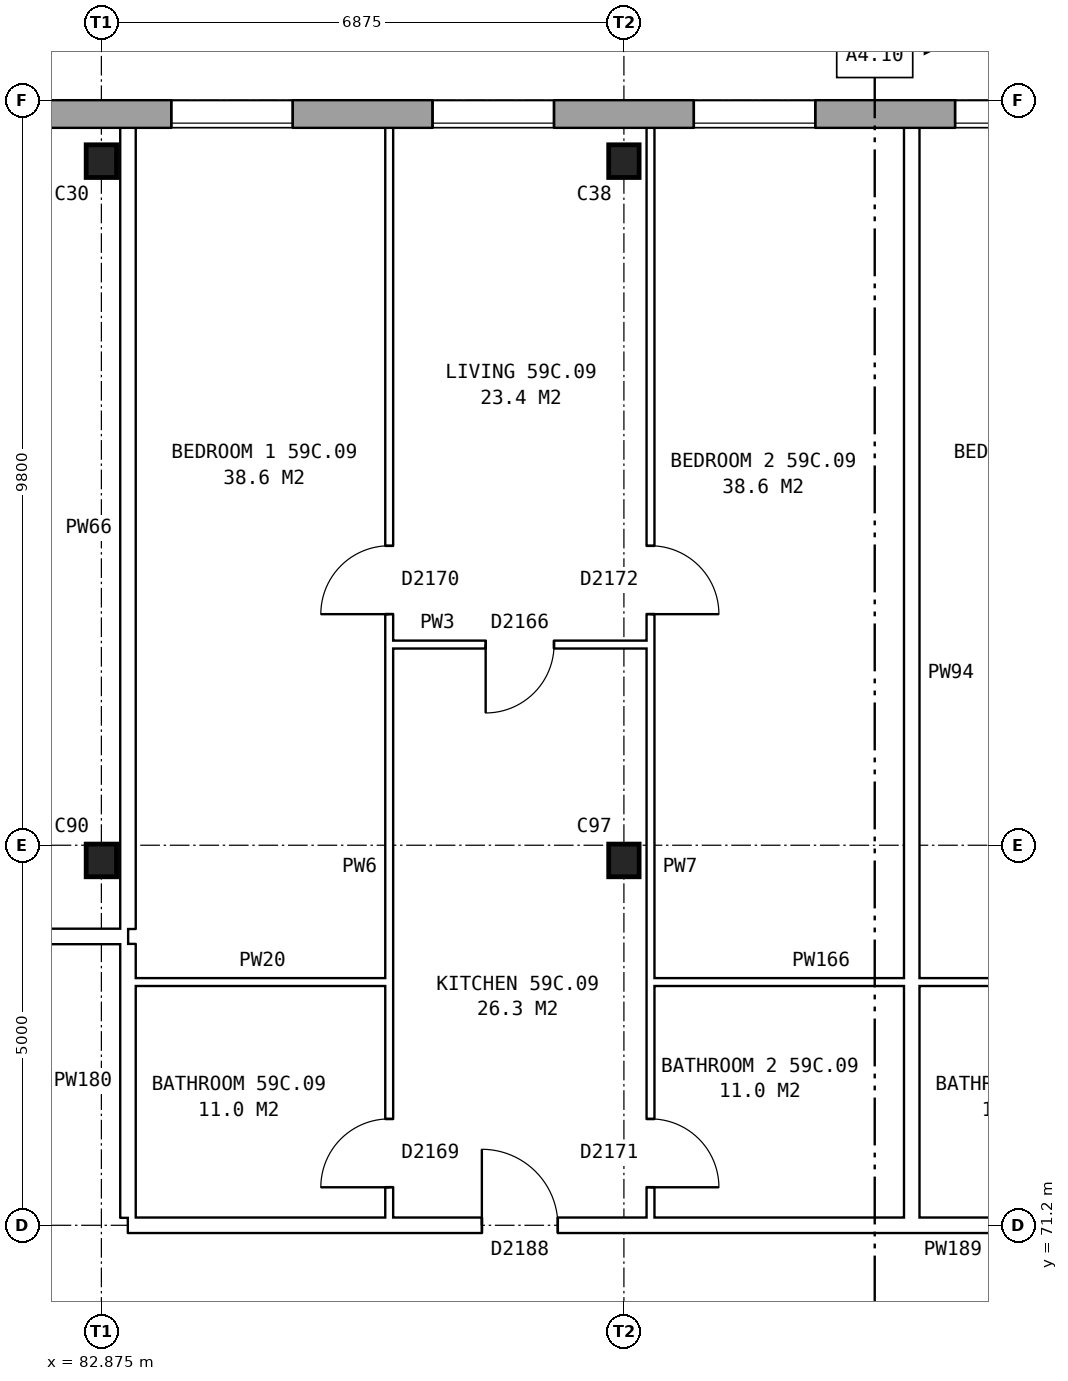
"""IFC4 building model, lengths in metres.
Left out: names, types, materials, properties, quantities, classifications, styles, units other than length and angle.
Written with IfcOpenShell. Run it as: python <this file> out.ifc"""

import sys

from ifc_helpers import new_model, si_unit, direction, frame, frame_2d, origin, origin_2d, place, context, subcontext, project, spatial, rectangle, i_section, extrude, element, fill, save


model = new_model("IFC4")
c1 = context("Model", 3, precision=1e-05, world=origin(), true_north=direction((0.0, 1.0)))
c2 = subcontext(c1, "Body", "Model", "MODEL_VIEW")
j1 = project(units=[si_unit("LENGTHUNIT", "METRE"), si_unit("PLANEANGLEUNIT", "RADIAN")], contexts=[c1])
p1 = place(None, origin())
s1 = spatial("IfcSite", under=j1, at=p1, CompositionType="ELEMENT")
p2 = place(p1, origin())
s2 = spatial("IfcBuilding", under=s1, at=p2, CompositionType="ELEMENT")
p3 = place(p2, frame((0.0, 0.0, 209.0)))
s3 = spatial("IfcBuildingStorey", under=s2, at=p3, CompositionType="ELEMENT", Elevation=209.0)
for number, where, z_axis, x_axis in (
    (1, (82.875, 76.0, 0.0), (0.0, 0.0, 1.0), (1.0, 0.0, 0.0)),
    (2, (89.75, 76.0, 0.0), (0.0, 0.0, 1.0), (1.0, 0.0, 0.0)),
    (3, (82.875, 85.2, 0.0), (0.0, 0.0, 1.0), (1.0, 0.0, 0.0)),
    (4, (89.75, 85.2, 0.0), (0.0, 0.0, 1.0), (1.0, 0.0, 0.0)),
):
    element("IfcColumn", number, at=place(p3, frame(where, z_axis=z_axis, x_axis=x_axis)), inside=s3, PredefinedType="COLUMN", context=c2, shape_type="SweptSolid", body=[
        extrude(i_section(OverallWidth=0.4, OverallDepth=0.43, WebThickness=0.04, FlangeThickness=0.04, at=origin_2d()), origin(), (0.0, 0.0, 1.0), 2.85),
    ])
p4 = place(p3, frame((131.05, 85.82, 0.0), z_axis=(0.0, 0.0, 1.0), x_axis=(-1.0, 0.0, 0.0)))
e5 = element("IfcWall", 5, at=p4, inside=s3, PredefinedType="STANDARD", context=c2, shape_type="SweptSolid", body=[
    extrude(rectangle(XDim=55.1, YDim=0.36, at=frame_2d((27.55, 0.0))), origin(), (0.0, 0.0, 1.0), 2.85),
])
p5 = place(p4, frame((0.969, 0.0, 0.8)))
e6 = element("IfcOpeningElement", 6, at=p5, cuts=e5, PredefinedType="OPENING", context=c2, shape_type="SweptSolid", body=[
    extrude(rectangle(XDim=1.6, YDim=1.8, at=frame_2d((0.8, 0.9))), frame((0.0, 0.19, 0.0), z_axis=(0.0, -1.0, 0.0), x_axis=(1.0, 0.0, 0.0)), (0.0, 0.0, 1.0), 0.38),
])
p6 = place(p4, frame((4.406, 0.0, 0.8)))
e7 = element("IfcOpeningElement", 7, at=p6, cuts=e5, PredefinedType="OPENING", context=c2, shape_type="SweptSolid", body=[
    extrude(rectangle(XDim=1.6, YDim=1.8, at=frame_2d((0.8, 0.9))), frame((0.0, 0.19, 0.0), z_axis=(0.0, -1.0, 0.0), x_axis=(1.0, 0.0, 0.0)), (0.0, 0.0, 1.0), 0.38),
])
p7 = place(p4, frame((7.844, 0.0, 0.8)))
e8 = element("IfcOpeningElement", 8, at=p7, cuts=e5, PredefinedType="OPENING", context=c2, shape_type="SweptSolid", body=[
    extrude(rectangle(XDim=1.6, YDim=1.8, at=frame_2d((0.8, 0.9))), frame((0.0, 0.19, 0.0), z_axis=(0.0, -1.0, 0.0), x_axis=(1.0, 0.0, 0.0)), (0.0, 0.0, 1.0), 0.38),
])
p8 = place(p4, frame((11.281, 0.0, 0.8)))
e9 = element("IfcOpeningElement", 9, at=p8, cuts=e5, PredefinedType="OPENING", context=c2, shape_type="SweptSolid", body=[
    extrude(rectangle(XDim=1.6, YDim=1.8, at=frame_2d((0.8, 0.9))), frame((0.0, 0.19, 0.0), z_axis=(0.0, -1.0, 0.0), x_axis=(1.0, 0.0, 0.0)), (0.0, 0.0, 1.0), 0.38),
])
p9 = place(p4, frame((14.719, 0.0, 0.8)))
e10 = element("IfcOpeningElement", 10, at=p9, cuts=e5, PredefinedType="OPENING", context=c2, shape_type="SweptSolid", body=[
    extrude(rectangle(XDim=1.6, YDim=1.8, at=frame_2d((0.8, 0.9))), frame((0.0, 0.19, 0.0), z_axis=(0.0, -1.0, 0.0), x_axis=(1.0, 0.0, 0.0)), (0.0, 0.0, 1.0), 0.38),
])
p10 = place(p4, frame((18.156, 0.0, 0.8)))
e11 = element("IfcOpeningElement", 11, at=p10, cuts=e5, PredefinedType="OPENING", context=c2, shape_type="SweptSolid", body=[
    extrude(rectangle(XDim=1.6, YDim=1.8, at=frame_2d((0.8, 0.9))), frame((0.0, 0.19, 0.0), z_axis=(0.0, -1.0, 0.0), x_axis=(1.0, 0.0, 0.0)), (0.0, 0.0, 1.0), 0.38),
])
p11 = place(p4, frame((21.594, 0.0, 0.8)))
e12 = element("IfcOpeningElement", 12, at=p11, cuts=e5, PredefinedType="OPENING", context=c2, shape_type="SweptSolid", body=[
    extrude(rectangle(XDim=1.6, YDim=1.8, at=frame_2d((0.8, 0.9))), frame((0.0, 0.19, 0.0), z_axis=(0.0, -1.0, 0.0), x_axis=(1.0, 0.0, 0.0)), (0.0, 0.0, 1.0), 0.38),
])
p12 = place(p4, frame((25.031, 0.0, 0.8)))
e13 = element("IfcOpeningElement", 13, at=p12, cuts=e5, PredefinedType="OPENING", context=c2, shape_type="SweptSolid", body=[
    extrude(rectangle(XDim=1.6, YDim=1.8, at=frame_2d((0.8, 0.9))), frame((0.0, 0.19, 0.0), z_axis=(0.0, -1.0, 0.0), x_axis=(1.0, 0.0, 0.0)), (0.0, 0.0, 1.0), 0.38),
])
p13 = place(p4, frame((28.469, 0.0, 0.8)))
e14 = element("IfcOpeningElement", 14, at=p13, cuts=e5, PredefinedType="OPENING", context=c2, shape_type="SweptSolid", body=[
    extrude(rectangle(XDim=1.6, YDim=1.8, at=frame_2d((0.8, 0.9))), frame((0.0, 0.19, 0.0), z_axis=(0.0, -1.0, 0.0), x_axis=(1.0, 0.0, 0.0)), (0.0, 0.0, 1.0), 0.38),
])
p14 = place(p4, frame((31.906, 0.0, 0.8)))
e15 = element("IfcOpeningElement", 15, at=p14, cuts=e5, PredefinedType="OPENING", context=c2, shape_type="SweptSolid", body=[
    extrude(rectangle(XDim=1.6, YDim=1.8, at=frame_2d((0.8, 0.9))), frame((0.0, 0.19, 0.0), z_axis=(0.0, -1.0, 0.0), x_axis=(1.0, 0.0, 0.0)), (0.0, 0.0, 1.0), 0.38),
])
p15 = place(p4, frame((35.344, 0.0, 0.8)))
e16 = element("IfcOpeningElement", 16, at=p15, cuts=e5, PredefinedType="OPENING", context=c2, shape_type="SweptSolid", body=[
    extrude(rectangle(XDim=1.6, YDim=1.8, at=frame_2d((0.8, 0.9))), frame((0.0, 0.19, 0.0), z_axis=(0.0, -1.0, 0.0), x_axis=(1.0, 0.0, 0.0)), (0.0, 0.0, 1.0), 0.38),
])
p16 = place(p4, frame((38.781, 0.0, 0.8)))
e17 = element("IfcOpeningElement", 17, at=p16, cuts=e5, PredefinedType="OPENING", context=c2, shape_type="SweptSolid", body=[
    extrude(rectangle(XDim=1.6, YDim=1.8, at=frame_2d((0.8, 0.9))), frame((0.0, 0.19, 0.0), z_axis=(0.0, -1.0, 0.0), x_axis=(1.0, 0.0, 0.0)), (0.0, 0.0, 1.0), 0.38),
])
p17 = place(p4, frame((42.219, 0.0, 0.8)))
e18 = element("IfcOpeningElement", 18, at=p17, cuts=e5, PredefinedType="OPENING", context=c2, shape_type="SweptSolid", body=[
    extrude(rectangle(XDim=1.6, YDim=1.8, at=frame_2d((0.8, 0.9))), frame((0.0, 0.19, 0.0), z_axis=(0.0, -1.0, 0.0), x_axis=(1.0, 0.0, 0.0)), (0.0, 0.0, 1.0), 0.38),
])
p18 = place(p4, frame((45.656, 0.0, 0.8)))
e19 = element("IfcOpeningElement", 19, at=p18, cuts=e5, PredefinedType="OPENING", context=c2, shape_type="SweptSolid", body=[
    extrude(rectangle(XDim=1.6, YDim=1.8, at=frame_2d((0.8, 0.9))), frame((0.0, 0.19, 0.0), z_axis=(0.0, -1.0, 0.0), x_axis=(1.0, 0.0, 0.0)), (0.0, 0.0, 1.0), 0.38),
])
p19 = place(p4, frame((49.094, 0.0, 0.8)))
e20 = element("IfcOpeningElement", 20, at=p19, cuts=e5, PredefinedType="OPENING", context=c2, shape_type="SweptSolid", body=[
    extrude(rectangle(XDim=1.6, YDim=1.8, at=frame_2d((0.8, 0.9))), frame((0.0, 0.19, 0.0), z_axis=(0.0, -1.0, 0.0), x_axis=(1.0, 0.0, 0.0)), (0.0, 0.0, 1.0), 0.38),
])
p20 = place(p4, frame((52.531, 0.0, 0.8)))
e21 = element("IfcOpeningElement", 21, at=p20, cuts=e5, PredefinedType="OPENING", context=c2, shape_type="SweptSolid", body=[
    extrude(rectangle(XDim=1.6, YDim=1.8, at=frame_2d((0.8, 0.9))), frame((0.0, 0.19, 0.0), z_axis=(0.0, -1.0, 0.0), x_axis=(1.0, 0.0, 0.0)), (0.0, 0.0, 1.0), 0.38),
])
p21 = place(p3, frame((83.225, 71.2, 0.0), z_axis=(0.0, 0.0, 1.0), x_axis=(1.0, 0.0, 0.0)))
e22 = element("IfcWall", 22, at=p21, inside=s3, PredefinedType="PARTITIONING", context=c2, shape_type="SweptSolid", body=[
    extrude(rectangle(XDim=41.25, YDim=0.2, at=frame_2d((20.625, 0.0))), origin(), (0.0, 0.0, 1.0), 2.85),
])
p22 = place(p21, frame((4.656, 0.0, 0.0)))
e23 = element("IfcOpeningElement", 23, at=p22, cuts=e22, PredefinedType="OPENING", context=c2, shape_type="SweptSolid", body=[
    extrude(rectangle(XDim=1.0, YDim=2.1, at=frame_2d((0.5, 1.05))), frame((0.0, 0.11, 0.0), z_axis=(0.0, -1.0, 0.0), x_axis=(1.0, 0.0, 0.0)), (0.0, 0.0, 1.0), 0.22),
])
p23 = place(p21, frame((14.969, 0.0, 0.0)))
e24 = element("IfcOpeningElement", 24, at=p23, cuts=e22, PredefinedType="OPENING", context=c2, shape_type="SweptSolid", body=[
    extrude(rectangle(XDim=1.0, YDim=2.1, at=frame_2d((0.5, 1.05))), frame((0.0, 0.11, 0.0), z_axis=(0.0, -1.0, 0.0), x_axis=(1.0, 0.0, 0.0)), (0.0, 0.0, 1.0), 0.22),
])
p24 = place(p21, frame((25.281, 0.0, 0.0)))
e25 = element("IfcOpeningElement", 25, at=p24, cuts=e22, PredefinedType="OPENING", context=c2, shape_type="SweptSolid", body=[
    extrude(rectangle(XDim=1.0, YDim=2.1, at=frame_2d((0.5, 1.05))), frame((0.0, 0.11, 0.0), z_axis=(0.0, -1.0, 0.0), x_axis=(1.0, 0.0, 0.0)), (0.0, 0.0, 1.0), 0.22),
])
p25 = place(p21, frame((35.594, 0.0, 0.0)))
e26 = element("IfcOpeningElement", 26, at=p25, cuts=e22, PredefinedType="OPENING", context=c2, shape_type="SweptSolid", body=[
    extrude(rectangle(XDim=1.0, YDim=2.1, at=frame_2d((0.5, 1.05))), frame((0.0, 0.11, 0.0), z_axis=(0.0, -1.0, 0.0), x_axis=(1.0, 0.0, 0.0)), (0.0, 0.0, 1.0), 0.22),
])
p26 = place(p3, frame((83.325, 74.4, 0.0), z_axis=(0.0, 0.0, 1.0), x_axis=(1.0, 0.0, 0.0)))
e27 = element("IfcWall", 27, at=p26, inside=s3, PredefinedType="PARTITIONING", context=c2, shape_type="SweptSolid", body=[
    extrude(rectangle(XDim=3.337, YDim=0.1, at=frame_2d((1.668, 0.0))), origin(), (0.0, 0.0, 1.0), 2.85),
])
p27 = place(p3, frame((90.1, 74.4, 0.0), z_axis=(0.0, 0.0, 1.0), x_axis=(1.0, 0.0, 0.0)))
e28 = element("IfcWall", 28, at=p27, inside=s3, PredefinedType="PARTITIONING", context=c2, shape_type="SweptSolid", body=[
    extrude(rectangle(XDim=6.875, YDim=0.1, at=frame_2d((3.438, 0.0))), origin(), (0.0, 0.0, 1.0), 2.85),
])
p28 = place(p3, frame((75.64, 75.0, 0.0), z_axis=(0.0, 0.0, 1.0), x_axis=(1.0, 0.0, 0.0)))
e29 = element("IfcWall", 29, at=p28, inside=s3, PredefinedType="PARTITIONING", context=c2, shape_type="SweptSolid", body=[
    extrude(rectangle(XDim=7.585, YDim=0.2, at=frame_2d((3.792, 0.0))), origin(), (0.0, 0.0, 1.0), 2.85),
])
p29 = place(p28, frame((3.343, 0.0, 0.0)))
e30 = element("IfcOpeningElement", 30, at=p29, cuts=e29, PredefinedType="OPENING", context=c2, shape_type="SweptSolid", body=[
    extrude(rectangle(XDim=0.9, YDim=2.1, at=frame_2d((0.45, 1.05))), frame((0.0, 0.11, 0.0), z_axis=(0.0, -1.0, 0.0), x_axis=(1.0, 0.0, 0.0)), (0.0, 0.0, 1.0), 0.22),
])
p30 = place(p3, frame((86.662, 78.84, 0.0), z_axis=(0.0, 0.0, 1.0), x_axis=(1.0, 0.0, 0.0)))
e31 = element("IfcWall", 31, at=p30, inside=s3, PredefinedType="PARTITIONING", context=c2, shape_type="SweptSolid", body=[
    extrude(rectangle(XDim=3.438, YDim=0.1, at=frame_2d((1.719, 0.0))), origin(), (0.0, 0.0, 1.0), 2.85),
])
p31 = place(p30, frame((1.269, 0.0, 0.0)))
e32 = element("IfcOpeningElement", 32, at=p31, cuts=e31, PredefinedType="OPENING", context=c2, shape_type="SweptSolid", body=[
    extrude(rectangle(XDim=0.9, YDim=2.1, at=frame_2d((0.45, 1.05))), frame((0.0, 0.06, 0.0), z_axis=(0.0, -1.0, 0.0), x_axis=(1.0, 0.0, 0.0)), (0.0, 0.0, 1.0), 0.12),
])
p32 = place(p3, frame((83.225, 71.3, 0.0), z_axis=(0.0, 0.0, 1.0), x_axis=(0.0, 1.0, 0.0)))
e33 = element("IfcWall", 33, at=p32, inside=s3, PredefinedType="PARTITIONING", context=c2, shape_type="SweptSolid", body=[
    extrude(rectangle(XDim=3.6, YDim=0.2, at=frame_2d((1.8, 0.0))), origin(), (0.0, 0.0, 1.0), 2.85),
])
p33 = place(p3, frame((83.225, 75.1, 0.0), z_axis=(0.0, 0.0, 1.0), x_axis=(0.0, 1.0, 0.0)))
e34 = element("IfcWall", 34, at=p33, inside=s3, PredefinedType="PARTITIONING", context=c2, shape_type="SweptSolid", body=[
    extrude(rectangle(XDim=10.54, YDim=0.2, at=frame_2d((5.27, 0.0))), origin(), (0.0, 0.0, 1.0), 2.85),
])
p34 = place(p3, frame((86.662, 71.3, 0.0), z_axis=(0.0, 0.0, 1.0), x_axis=(0.0, 1.0, 0.0)))
e35 = element("IfcWall", 35, at=p34, inside=s3, PredefinedType="PARTITIONING", context=c2, shape_type="SweptSolid", body=[
    extrude(rectangle(XDim=14.34, YDim=0.1, at=frame_2d((7.17, 0.0))), origin(), (0.0, 0.0, 1.0), 2.85),
])
p35 = place(p34, frame((7.94, 0.0, 0.0)))
e36 = element("IfcOpeningElement", 36, at=p35, cuts=e35, PredefinedType="OPENING", context=c2, shape_type="SweptSolid", body=[
    extrude(rectangle(XDim=0.9, YDim=2.1, at=frame_2d((0.45, 1.05))), frame((0.0, 0.06, 0.0), z_axis=(0.0, -1.0, 0.0), x_axis=(1.0, 0.0, 0.0)), (0.0, 0.0, 1.0), 0.12),
])
p36 = place(p34, frame((0.4, 0.0, 0.0)))
e37 = element("IfcOpeningElement", 37, at=p36, cuts=e35, PredefinedType="OPENING", context=c2, shape_type="SweptSolid", body=[
    extrude(rectangle(XDim=0.9, YDim=2.1, at=frame_2d((0.45, 1.05))), frame((0.0, 0.06, 0.0), z_axis=(0.0, -1.0, 0.0), x_axis=(1.0, 0.0, 0.0)), (0.0, 0.0, 1.0), 0.12),
])
p37 = place(p3, frame((90.1, 71.3, 0.0), z_axis=(0.0, 0.0, 1.0), x_axis=(0.0, 1.0, 0.0)))
e38 = element("IfcWall", 38, at=p37, inside=s3, PredefinedType="PARTITIONING", context=c2, shape_type="SweptSolid", body=[
    extrude(rectangle(XDim=14.34, YDim=0.1, at=frame_2d((7.17, 0.0))), origin(), (0.0, 0.0, 1.0), 2.85),
])
p38 = place(p37, frame((7.94, 0.0, 0.0)))
e39 = element("IfcOpeningElement", 39, at=p38, cuts=e38, PredefinedType="OPENING", context=c2, shape_type="SweptSolid", body=[
    extrude(rectangle(XDim=0.9, YDim=2.1, at=frame_2d((0.45, 1.05))), frame((0.0, 0.06, 0.0), z_axis=(0.0, -1.0, 0.0), x_axis=(1.0, 0.0, 0.0)), (0.0, 0.0, 1.0), 0.12),
])
p39 = place(p37, frame((0.4, 0.0, 0.0)))
e40 = element("IfcOpeningElement", 40, at=p39, cuts=e38, PredefinedType="OPENING", context=c2, shape_type="SweptSolid", body=[
    extrude(rectangle(XDim=0.9, YDim=2.1, at=frame_2d((0.45, 1.05))), frame((0.0, 0.06, 0.0), z_axis=(0.0, -1.0, 0.0), x_axis=(1.0, 0.0, 0.0)), (0.0, 0.0, 1.0), 0.12),
])
p40 = place(p3, frame((93.537, 71.3, 0.0), z_axis=(0.0, 0.0, 1.0), x_axis=(0.0, 1.0, 0.0)))
e41 = element("IfcWall", 41, at=p40, inside=s3, PredefinedType="PARTITIONING", context=c2, shape_type="SweptSolid", body=[
    extrude(rectangle(XDim=14.34, YDim=0.2, at=frame_2d((7.17, 0.0))), origin(), (0.0, 0.0, 1.0), 2.85),
])
p41 = place(p15, origin())
e42 = element("IfcWindow", 42, at=p41, inside=s3, PartitioningType="SINGLE_PANEL", PredefinedType="WINDOW", context=c2, shape_type="SweptSolid", body=[
    extrude(rectangle(XDim=1.6, YDim=1.8, at=frame_2d((0.8, 0.9))), frame((0.0, 0.15, 0.0), z_axis=(0.0, -1.0, 0.0), x_axis=(1.0, 0.0, 0.0)), (0.0, 0.0, 1.0), 0.06),
])
fill(e16, e42)
p42 = place(p16, origin())
e43 = element("IfcWindow", 43, at=p42, inside=s3, PartitioningType="SINGLE_PANEL", PredefinedType="WINDOW", context=c2, shape_type="SweptSolid", body=[
    extrude(rectangle(XDim=1.6, YDim=1.8, at=frame_2d((0.8, 0.9))), frame((0.0, 0.15, 0.0), z_axis=(0.0, -1.0, 0.0), x_axis=(1.0, 0.0, 0.0)), (0.0, 0.0, 1.0), 0.06),
])
fill(e17, e43)
p43 = place(p17, origin())
e44 = element("IfcWindow", 44, at=p43, inside=s3, PartitioningType="SINGLE_PANEL", PredefinedType="WINDOW", context=c2, shape_type="SweptSolid", body=[
    extrude(rectangle(XDim=1.6, YDim=1.8, at=frame_2d((0.8, 0.9))), frame((0.0, 0.15, 0.0), z_axis=(0.0, -1.0, 0.0), x_axis=(1.0, 0.0, 0.0)), (0.0, 0.0, 1.0), 0.06),
])
fill(e18, e44)
p44 = place(p18, origin())
e45 = element("IfcWindow", 45, at=p44, inside=s3, PartitioningType="SINGLE_PANEL", PredefinedType="WINDOW", context=c2, shape_type="SweptSolid", body=[
    extrude(rectangle(XDim=1.6, YDim=1.8, at=frame_2d((0.8, 0.9))), frame((0.0, 0.15, 0.0), z_axis=(0.0, -1.0, 0.0), x_axis=(1.0, 0.0, 0.0)), (0.0, 0.0, 1.0), 0.06),
])
fill(e19, e45)
p45 = place(p35, origin())
e46 = element("IfcDoor", 46, at=p45, inside=s3, OperationType="SINGLE_SWING_LEFT", PredefinedType="DOOR", context=c2, shape_type="SweptSolid", body=[
    extrude(rectangle(XDim=0.9, YDim=2.1, at=frame_2d((0.45, 1.05))), frame((0.0, 0.025, 0.0), z_axis=(0.0, -1.0, 0.0), x_axis=(1.0, 0.0, 0.0)), (0.0, 0.0, 1.0), 0.05),
])
fill(e36, e46)
p46 = place(p38, frame((0.9, 0.0, 0.0), z_axis=(0.0, 0.0, 1.0), x_axis=(-1.0, 0.0, 0.0)))
e47 = element("IfcDoor", 47, at=p46, inside=s3, OperationType="SINGLE_SWING_RIGHT", PredefinedType="DOOR", context=c2, shape_type="SweptSolid", body=[
    extrude(rectangle(XDim=0.9, YDim=2.1, at=frame_2d((0.45, 1.05))), frame((0.0, 0.025, 0.0), z_axis=(0.0, -1.0, 0.0), x_axis=(1.0, 0.0, 0.0)), (0.0, 0.0, 1.0), 0.05),
])
fill(e39, e47)
p47 = place(p22, origin())
e48 = element("IfcDoor", 48, at=p47, inside=s3, OperationType="SINGLE_SWING_LEFT", PredefinedType="DOOR", context=c2, shape_type="SweptSolid", body=[
    extrude(rectangle(XDim=1.0, YDim=2.1, at=frame_2d((0.5, 1.05))), frame((0.0, 0.025, 0.0), z_axis=(0.0, -1.0, 0.0), x_axis=(1.0, 0.0, 0.0)), (0.0, 0.0, 1.0), 0.05),
])
fill(e23, e48)
p48 = place(p31, frame((0.9, 0.0, 0.0), z_axis=(0.0, 0.0, 1.0), x_axis=(-1.0, 0.0, 0.0)))
e49 = element("IfcDoor", 49, at=p48, inside=s3, OperationType="SINGLE_SWING_RIGHT", PredefinedType="DOOR", context=c2, shape_type="SweptSolid", body=[
    extrude(rectangle(XDim=0.9, YDim=2.1, at=frame_2d((0.45, 1.05))), frame((0.0, 0.025, 0.0), z_axis=(0.0, -1.0, 0.0), x_axis=(1.0, 0.0, 0.0)), (0.0, 0.0, 1.0), 0.05),
])
fill(e32, e49)
p49 = place(p36, origin())
e50 = element("IfcDoor", 50, at=p49, inside=s3, OperationType="SINGLE_SWING_LEFT", PredefinedType="DOOR", context=c2, shape_type="SweptSolid", body=[
    extrude(rectangle(XDim=0.9, YDim=2.1, at=frame_2d((0.45, 1.05))), frame((0.0, 0.025, 0.0), z_axis=(0.0, -1.0, 0.0), x_axis=(1.0, 0.0, 0.0)), (0.0, 0.0, 1.0), 0.05),
])
fill(e37, e50)
p50 = place(p39, frame((0.9, 0.0, 0.0), z_axis=(0.0, 0.0, 1.0), x_axis=(-1.0, 0.0, 0.0)))
e51 = element("IfcDoor", 51, at=p50, inside=s3, OperationType="SINGLE_SWING_RIGHT", PredefinedType="DOOR", context=c2, shape_type="SweptSolid", body=[
    extrude(rectangle(XDim=0.9, YDim=2.1, at=frame_2d((0.45, 1.05))), frame((0.0, 0.025, 0.0), z_axis=(0.0, -1.0, 0.0), x_axis=(1.0, 0.0, 0.0)), (0.0, 0.0, 1.0), 0.05),
])
fill(e40, e51)
save(model, sys.argv[1])
